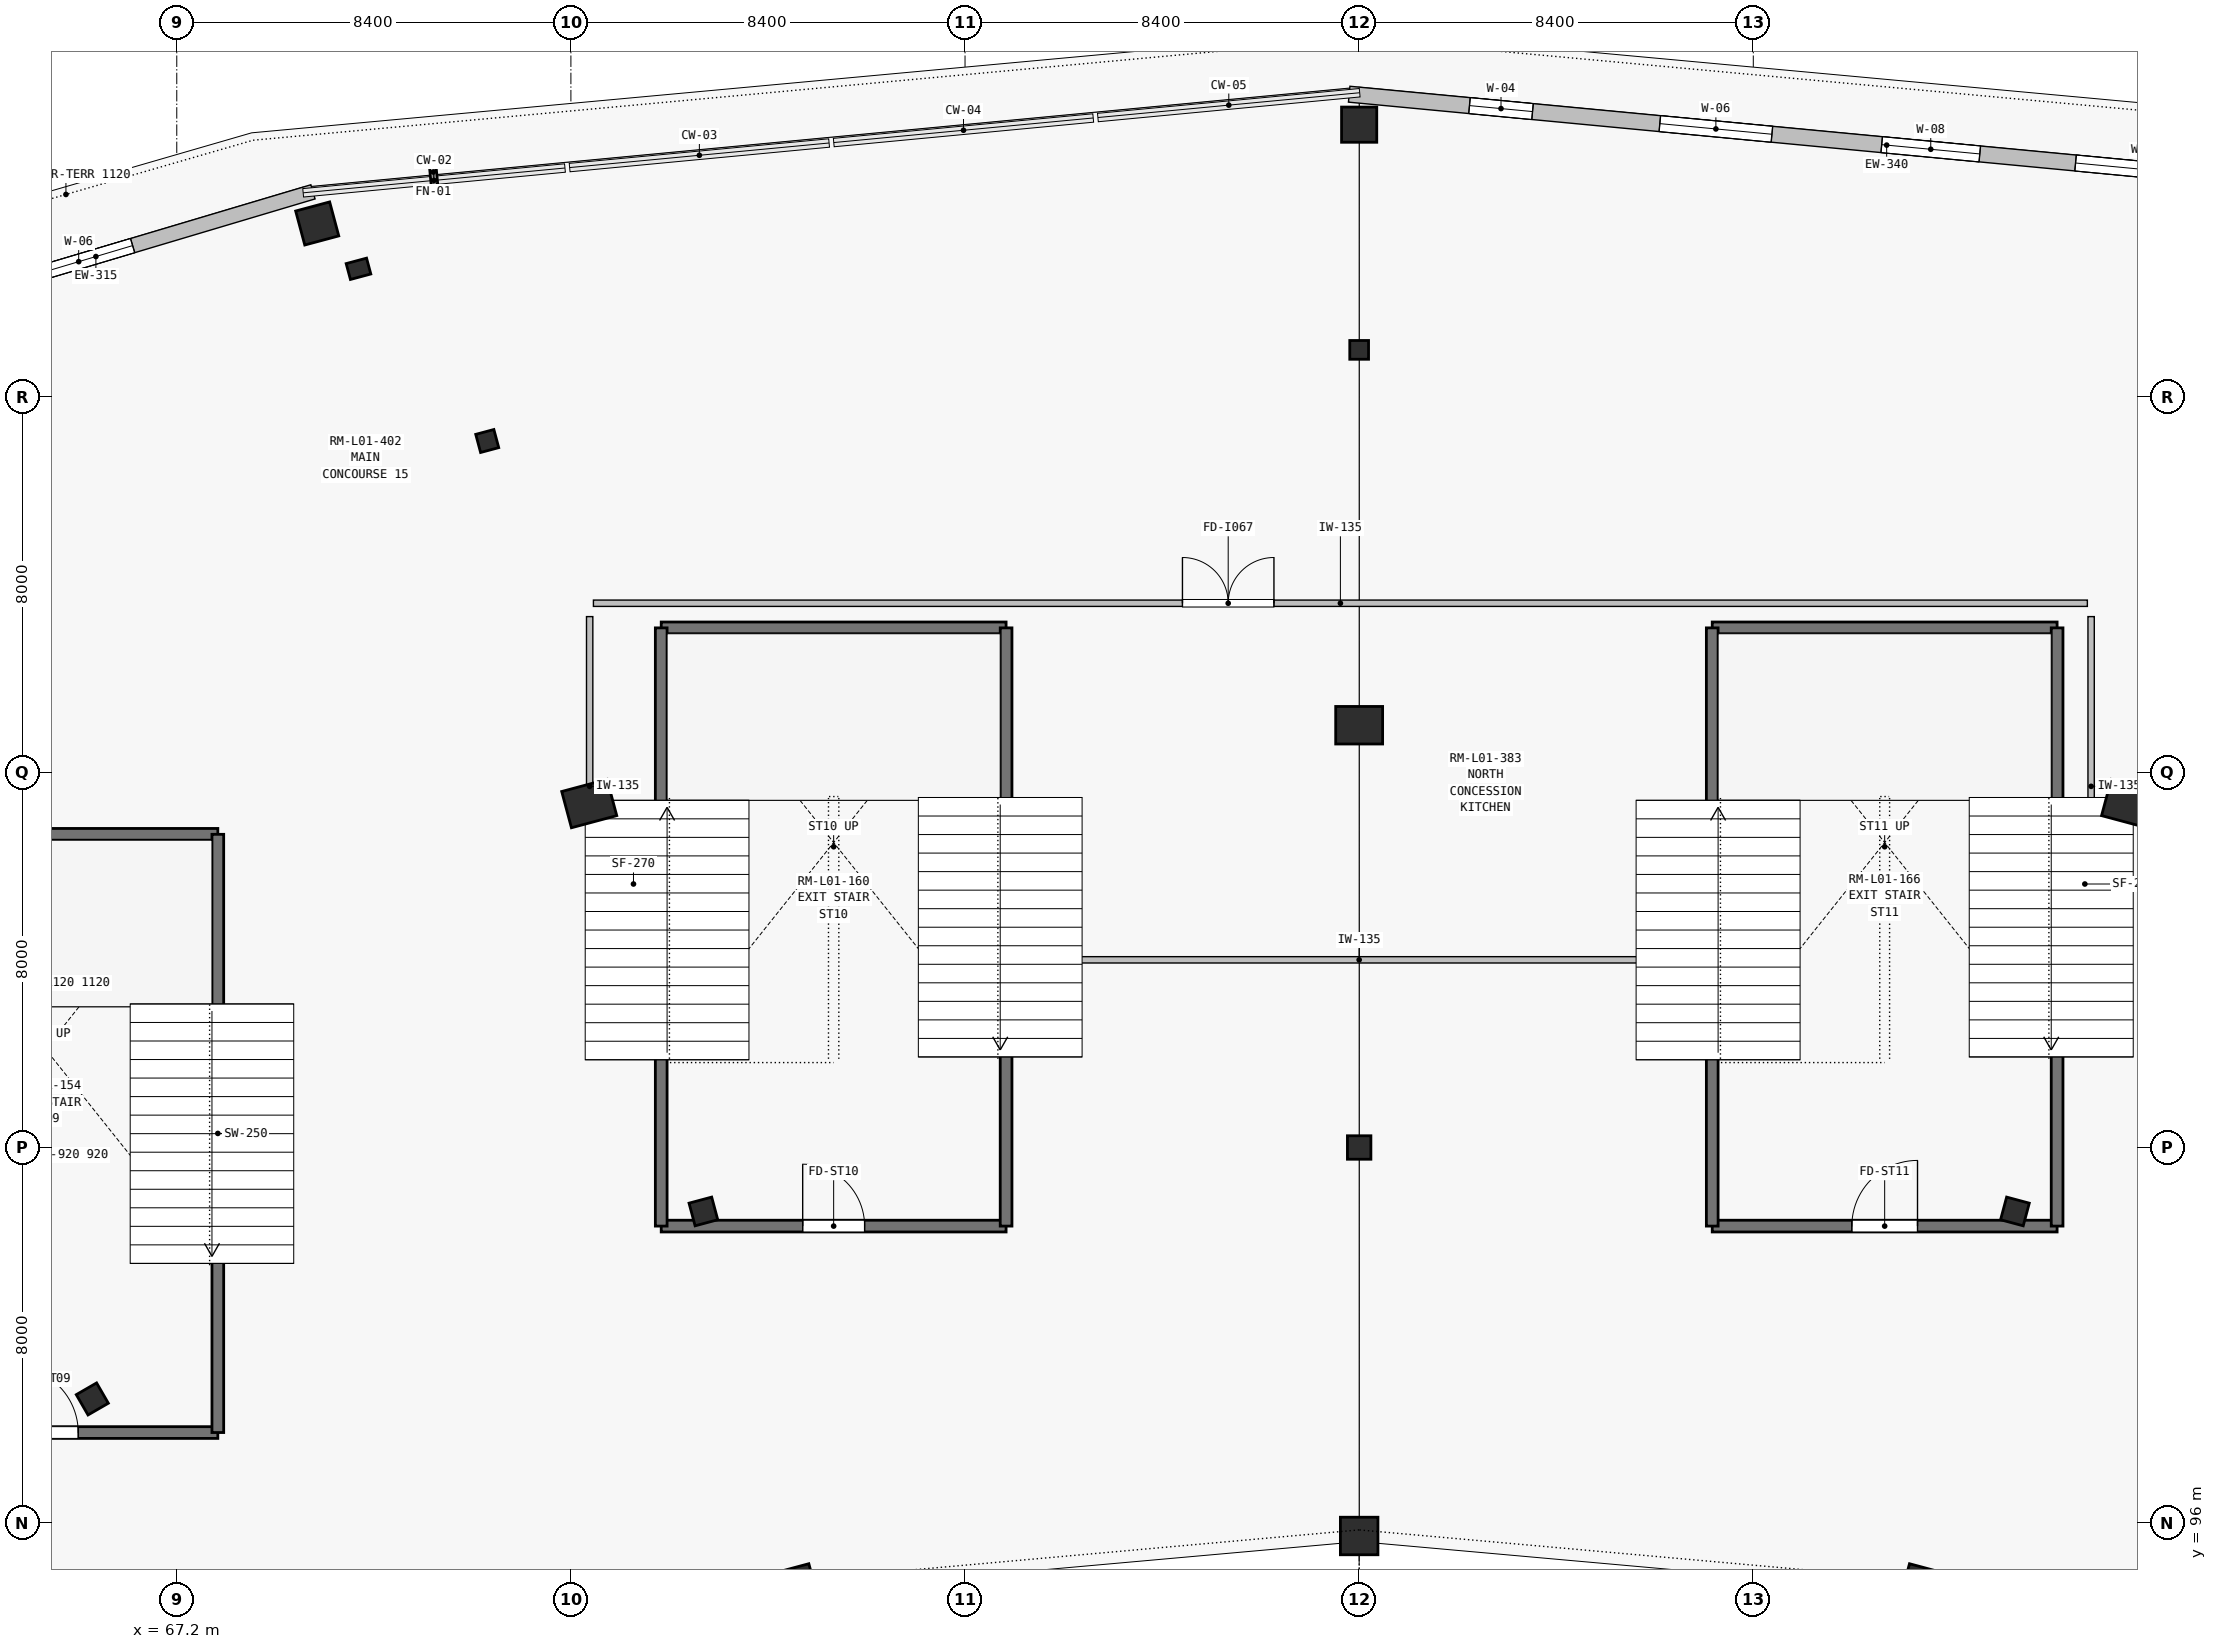
"""IFC4 building model, lengths in metres.
Left out: names, types, materials, properties, quantities, classifications, styles, units other than length and angle.
Written with IfcOpenShell. Run it as: python <this file> out.ifc"""

import sys

from ifc_helpers import new_model, si_unit, direction, frame, frame_2d, origin, origin_2d, place, context, subcontext, project, spatial, rectangle, i_section, extrude, element, fill, save


model = new_model("IFC4")
c1 = context("Model", 3, precision=1e-05, world=origin(), true_north=direction((0.0, 1.0)))
c2 = subcontext(c1, "Body", "Model", "MODEL_VIEW")
j1 = project(units=[si_unit("LENGTHUNIT", "METRE"), si_unit("PLANEANGLEUNIT", "RADIAN")], contexts=[c1])
p1 = place(None, origin())
s1 = spatial("IfcSite", under=j1, at=p1, CompositionType="ELEMENT")
p2 = place(p1, origin())
s2 = spatial("IfcBuilding", under=s1, at=p2, CompositionType="ELEMENT")
p3 = place(p2, frame((0.0, 0.0, 5.4)))
s3 = spatial("IfcBuildingStorey", under=s2, at=p3, CompositionType="ELEMENT", Elevation=5.4)
for number, where, z_axis, x_axis in (
    (1, (106.376, 102.637, 0.0), (0.0, 0.0, 1.0), (0.259, 0.966, 0.0)),
    (2, (92.4, 104.0, 0.0), (0.0, 0.0, 1.0), (0.0, 1.0, 0.0)),
    (3, (78.424, 102.637, 0.0), (0.0, 0.0, 1.0), (-0.259, 0.966, 0.0)),
    (4, (65.4, 98.641, 0.0), (0.0, 0.0, 1.0), (-0.5, 0.866, 0.0)),
):
    element("IfcColumn", number, at=place(p3, frame(where, z_axis=z_axis, x_axis=x_axis)), inside=s3, PredefinedType="COLUMN", context=c2, shape_type="SweptSolid", body=[
        extrude(i_section(OverallWidth=0.5, OverallDepth=0.5, WebThickness=0.02, FlangeThickness=0.035, at=origin_2d()), origin(), (0.0, 0.0, 1.0), 4.5),
    ])
for number, where, z_axis, x_axis in (
    (5, (104.412, 94.639, 0.0), (0.0, 0.0, 1.0), (0.259, 0.966, 0.0)),
    (6, (92.4, 95.72, 0.0), (0.0, 0.0, 1.0), (0.0, 1.0, 0.0)),
    (7, (80.388, 94.639, 0.0), (0.0, 0.0, 1.0), (-0.259, 0.966, 0.0)),
):
    element("IfcColumn", number, at=place(p3, frame(where, z_axis=z_axis, x_axis=x_axis)), inside=s3, PredefinedType="COLUMN", context=c2, shape_type="SweptSolid", body=[
        extrude(rectangle(XDim=0.8, YDim=0.8, at=origin_2d()), origin(), (0.0, 0.0, 1.0), 4.5),
    ])
for number, where, z_axis, x_axis in (
    (8, (108.809, 111.33, 0.0), (0.0, 0.0, 1.0), (0.259, 0.966, 0.0)),
    (9, (92.4, 113.0, 0.0), (0.0, 0.0, 1.0), (0.0, 1.0, 0.0)),
    (10, (75.991, 111.33, 0.0), (0.0, 0.0, 1.0), (-0.259, 0.966, 0.0)),
):
    element("IfcColumn", number, at=place(p3, frame(where, z_axis=z_axis, x_axis=x_axis)), inside=s3, PredefinedType="COLUMN", context=c2, shape_type="SweptSolid", body=[
        extrude(rectangle(XDim=0.8, YDim=1.0, at=origin_2d()), origin(), (0.0, 0.0, 1.0), 4.5),
    ])
for number, where, z_axis, x_axis in (
    (11, (92.4, 121.0, 0.0), (0.0, 0.0, 1.0), (0.0, 1.0, 0.0)),
    (12, (73.817, 119.058, 0.0), (0.0, 0.0, 1.0), (-0.259, 0.966, 0.0)),
):
    element("IfcColumn", number, at=place(p3, frame(where, z_axis=z_axis, x_axis=x_axis)), inside=s3, PredefinedType="COLUMN", context=c2, shape_type="SweptSolid", body=[
        extrude(i_section(OverallWidth=0.4, OverallDepth=0.4, WebThickness=0.018, FlangeThickness=0.032, at=origin_2d()), origin(), (0.0, 0.0, 1.0), 4.5),
    ])
for number, where, z_axis, x_axis in (
    (13, (92.4, 125.8, 0.0), (0.0, 0.0, 1.0), (0.0, 1.0, 0.0)),
    (14, (70.193, 123.694, 0.0), (0.0, 0.0, 1.0), (-0.259, 0.966, 0.0)),
):
    element("IfcColumn", number, at=place(p3, frame(where, z_axis=z_axis, x_axis=x_axis)), inside=s3, PredefinedType="COLUMN", context=c2, shape_type="SweptSolid", body=[
        extrude(rectangle(XDim=0.75, YDim=0.75, at=origin_2d()), origin(), (0.0, 0.0, 1.0), 4.25),
    ])
p4 = place(p3, frame((71.073, 122.728, 0.0), z_axis=(0.0, 0.0, 1.0), x_axis=(-0.258819045103, 0.965925826289, 0.0)))
e15 = element("IfcColumn", 15, at=p4, inside=s3, PredefinedType="PILASTER", context=c2, shape_type="SweptSolid", body=[
    extrude(rectangle(XDim=0.35, YDim=0.45, at=origin_2d()), origin(), (0.0, 0.0, 1.0), 4.5),
])
p5 = place(p3, frame((48.77, 118.01, 0.0), z_axis=(0.0, 0.0, 1.0), x_axis=(0.958340022304, 0.285629833265, 0.0)))
e16 = element("IfcWall", 16, at=p5, inside=s3, PredefinedType="SOLIDWALL", context=c2, shape_type="SweptSolid", body=[
    extrude(rectangle(XDim=22.26, YDim=0.315, at=frame_2d((11.13, 0.0))), origin(), (0.0, 0.0, 1.0), 4.25),
])
p6 = place(p5, frame((2.525, 0.0, 0.9)))
e17 = element("IfcOpeningElement", 17, at=p6, cuts=e16, PredefinedType="OPENING", context=c2, shape_type="SweptSolid", body=[
    extrude(rectangle(XDim=1.45, YDim=1.4, at=frame_2d((0.725, 0.7))), frame((0.0, 0.167, 0.0), z_axis=(0.0, -1.0, 0.0), x_axis=(1.0, 0.0, 0.0)), (0.0, 0.0, 1.0), 0.335),
])
p7 = place(p5, frame((7.025, 0.0, 0.75)))
e18 = element("IfcOpeningElement", 18, at=p7, cuts=e16, PredefinedType="OPENING", context=c2, shape_type="SweptSolid", body=[
    extrude(rectangle(XDim=1.65, YDim=2.4, at=frame_2d((0.825, 1.2))), frame((0.0, 0.167, 0.0), z_axis=(0.0, -1.0, 0.0), x_axis=(1.0, 0.0, 0.0)), (0.0, 0.0, 1.0), 0.335),
])
p8 = place(p5, frame((11.775, 0.0, 0.75)))
e19 = element("IfcOpeningElement", 19, at=p8, cuts=e16, PredefinedType="OPENING", context=c2, shape_type="SweptSolid", body=[
    extrude(rectangle(XDim=1.35, YDim=2.3, at=frame_2d((0.675, 1.15))), frame((0.0, 0.167, 0.0), z_axis=(0.0, -1.0, 0.0), x_axis=(1.0, 0.0, 0.0)), (0.0, 0.0, 1.0), 0.335),
])
p9 = place(p5, frame((15.85, 0.0, 0.9)))
e20 = element("IfcOpeningElement", 20, at=p9, cuts=e16, PredefinedType="OPENING", context=c2, shape_type="SweptSolid", body=[
    extrude(rectangle(XDim=2.4, YDim=2.1, at=frame_2d((1.2, 1.05))), frame((0.0, 0.167, 0.0), z_axis=(0.0, -1.0, 0.0), x_axis=(1.0, 0.0, 0.0)), (0.0, 0.0, 1.0), 0.335),
])
p10 = place(p3, frame((92.188, 126.449, 0.0), z_axis=(0.0, 0.0, 1.0), x_axis=(0.995543549064, -0.094302926339, 0.0)))
e21 = element("IfcWall", 21, at=p10, inside=s3, PredefinedType="SOLIDWALL", context=c2, shape_type="SweptSolid", body=[
    extrude(rectangle(XDim=23.013, YDim=0.34, at=frame_2d((11.506, 0.0))), origin(), (0.0, 0.0, 1.0), 4.25),
])
p11 = place(p10, frame((2.575, 0.0, 0.75)))
e22 = element("IfcOpeningElement", 22, at=p11, cuts=e21, PredefinedType="OPENING", context=c2, shape_type="SweptSolid", body=[
    extrude(rectangle(XDim=1.35, YDim=2.3, at=frame_2d((0.675, 1.15))), frame((0.0, 0.18, 0.0), z_axis=(0.0, -1.0, 0.0), x_axis=(1.0, 0.0, 0.0)), (0.0, 0.0, 1.0), 0.36),
])
p12 = place(p10, frame((6.65, 0.0, 0.9)))
e23 = element("IfcOpeningElement", 23, at=p12, cuts=e21, PredefinedType="OPENING", context=c2, shape_type="SweptSolid", body=[
    extrude(rectangle(XDim=2.4, YDim=2.1, at=frame_2d((1.2, 1.05))), frame((0.0, 0.18, 0.0), z_axis=(0.0, -1.0, 0.0), x_axis=(1.0, 0.0, 0.0)), (0.0, 0.0, 1.0), 0.36),
])
p13 = place(p10, frame((11.4, 0.0, 0.9)))
e24 = element("IfcOpeningElement", 24, at=p13, cuts=e21, PredefinedType="OPENING", context=c2, shape_type="SweptSolid", body=[
    extrude(rectangle(XDim=2.1, YDim=2.0, at=frame_2d((1.05, 1.0))), frame((0.0, 0.18, 0.0), z_axis=(0.0, -1.0, 0.0), x_axis=(1.0, 0.0, 0.0)), (0.0, 0.0, 1.0), 0.36),
])
p14 = place(p10, frame((15.55, 0.0, 0.9)))
e25 = element("IfcOpeningElement", 25, at=p14, cuts=e21, PredefinedType="OPENING", context=c2, shape_type="SweptSolid", body=[
    extrude(rectangle(XDim=3.0, YDim=1.6, at=frame_2d((1.5, 0.8))), frame((0.0, 0.18, 0.0), z_axis=(0.0, -1.0, 0.0), x_axis=(1.0, 0.0, 0.0)), (0.0, 0.0, 1.0), 0.36),
])
p15 = place(p3, frame((60.725, 97.925, 0.0), z_axis=(0.0, 0.0, 1.0), x_axis=(1.0, 0.0, 0.0)))
e26 = element("IfcWall", 26, at=p15, inside=s3, PredefinedType="SHEAR", context=c2, shape_type="SweptSolid", body=[
    extrude(rectangle(XDim=7.35, YDim=0.25, at=frame_2d((3.675, 0.0))), origin(), (0.0, 0.0, 1.0), 4.5),
])
p16 = place(p15, frame((2.975, 0.0, 0.0)))
e27 = element("IfcOpeningElement", 27, at=p16, cuts=e26, PredefinedType="OPENING", context=c2, shape_type="SweptSolid", body=[
    extrude(rectangle(XDim=1.4, YDim=2.2, at=frame_2d((0.7, 1.1))), frame((0.0, 0.135, 0.0), z_axis=(0.0, -1.0, 0.0), x_axis=(1.0, 0.0, 0.0)), (0.0, 0.0, 1.0), 0.27),
])
p17 = place(p3, frame((60.725, 110.675, 0.0), z_axis=(0.0, 0.0, 1.0), x_axis=(1.0, 0.0, 0.0)))
e28 = element("IfcWall", 28, at=p17, inside=s3, PredefinedType="SHEAR", context=c2, shape_type="SweptSolid", body=[
    extrude(rectangle(XDim=7.35, YDim=0.25, at=frame_2d((3.675, 0.0))), origin(), (0.0, 0.0, 1.0), 4.5),
])
p18 = place(p3, frame((68.075, 97.925, 0.0), z_axis=(0.0, 0.0, 1.0), x_axis=(0.0, 1.0, 0.0)))
e29 = element("IfcWall", 29, at=p18, inside=s3, PredefinedType="SHEAR", context=c2, shape_type="SweptSolid", body=[
    extrude(rectangle(XDim=12.75, YDim=0.25, at=frame_2d((6.375, 0.0))), origin(), (0.0, 0.0, 1.0), 4.5),
])
p19 = place(p3, frame((77.525, 102.325, 0.0), z_axis=(0.0, 0.0, 1.0), x_axis=(1.0, 0.0, 0.0)))
e30 = element("IfcWall", 30, at=p19, inside=s3, PredefinedType="SHEAR", context=c2, shape_type="SweptSolid", body=[
    extrude(rectangle(XDim=7.35, YDim=0.25, at=frame_2d((3.675, 0.0))), origin(), (0.0, 0.0, 1.0), 4.5),
])
p20 = place(p19, frame((3.015, 0.0, 0.0)))
e31 = element("IfcOpeningElement", 31, at=p20, cuts=e30, PredefinedType="OPENING", context=c2, shape_type="SweptSolid", body=[
    extrude(rectangle(XDim=1.32, YDim=2.2, at=frame_2d((0.66, 1.1))), frame((0.0, 0.135, 0.0), z_axis=(0.0, -1.0, 0.0), x_axis=(1.0, 0.0, 0.0)), (0.0, 0.0, 1.0), 0.27),
])
p21 = place(p3, frame((77.525, 115.075, 0.0), z_axis=(0.0, 0.0, 1.0), x_axis=(1.0, 0.0, 0.0)))
e32 = element("IfcWall", 32, at=p21, inside=s3, PredefinedType="SHEAR", context=c2, shape_type="SweptSolid", body=[
    extrude(rectangle(XDim=7.35, YDim=0.25, at=frame_2d((3.675, 0.0))), origin(), (0.0, 0.0, 1.0), 4.5),
])
for number, where, z_axis, x_axis in (
    (33, (77.525, 102.325, 0.0), (0.0, 0.0, 1.0), (0.0, 1.0, 0.0)),
    (34, (84.875, 102.325, 0.0), (0.0, 0.0, 1.0), (0.0, 1.0, 0.0)),
):
    element("IfcWall", number, at=place(p3, frame(where, z_axis=z_axis, x_axis=x_axis)), inside=s3, PredefinedType="SHEAR", context=c2, shape_type="SweptSolid", body=[
        extrude(rectangle(XDim=12.75, YDim=0.25, at=frame_2d((6.375, 0.0))), origin(), (0.0, 0.0, 1.0), 4.5),
    ])
p22 = place(p3, frame((99.925, 102.325, 0.0), z_axis=(0.0, 0.0, 1.0), x_axis=(1.0, 0.0, 0.0)))
e35 = element("IfcWall", 35, at=p22, inside=s3, PredefinedType="SHEAR", context=c2, shape_type="SweptSolid", body=[
    extrude(rectangle(XDim=7.35, YDim=0.25, at=frame_2d((3.675, 0.0))), origin(), (0.0, 0.0, 1.0), 4.5),
])
p23 = place(p22, frame((2.975, 0.0, 0.0)))
e36 = element("IfcOpeningElement", 36, at=p23, cuts=e35, PredefinedType="OPENING", context=c2, shape_type="SweptSolid", body=[
    extrude(rectangle(XDim=1.4, YDim=2.2, at=frame_2d((0.7, 1.1))), frame((0.0, 0.135, 0.0), z_axis=(0.0, -1.0, 0.0), x_axis=(1.0, 0.0, 0.0)), (0.0, 0.0, 1.0), 0.27),
])
p24 = place(p3, frame((99.925, 115.075, 0.0), z_axis=(0.0, 0.0, 1.0), x_axis=(1.0, 0.0, 0.0)))
e37 = element("IfcWall", 37, at=p24, inside=s3, PredefinedType="SHEAR", context=c2, shape_type="SweptSolid", body=[
    extrude(rectangle(XDim=7.35, YDim=0.25, at=frame_2d((3.675, 0.0))), origin(), (0.0, 0.0, 1.0), 4.5),
])
for number, where, z_axis, x_axis in (
    (38, (99.925, 102.325, 0.0), (0.0, 0.0, 1.0), (0.0, 1.0, 0.0)),
    (39, (107.275, 102.325, 0.0), (0.0, 0.0, 1.0), (0.0, 1.0, 0.0)),
):
    element("IfcWall", number, at=place(p3, frame(where, z_axis=z_axis, x_axis=x_axis)), inside=s3, PredefinedType="SHEAR", context=c2, shape_type="SweptSolid", body=[
        extrude(rectangle(XDim=12.75, YDim=0.25, at=frame_2d((6.375, 0.0))), origin(), (0.0, 0.0, 1.0), 4.5),
    ])
p25 = place(p3, frame((76.08, 115.6, 0.0), z_axis=(0.0, 0.0, 1.0), x_axis=(1.0, 0.0, 0.0)))
e40 = element("IfcWall", 40, at=p25, inside=s3, PredefinedType="PARTITIONING", context=c2, shape_type="SweptSolid", body=[
    extrude(rectangle(XDim=31.84, YDim=0.135, at=frame_2d((15.92, 0.0))), origin(), (0.0, 0.0, 1.0), 3.662),
])
p26 = place(p25, frame((12.554, 0.0, 0.0)))
e41 = element("IfcOpeningElement", 41, at=p26, cuts=e40, PredefinedType="OPENING", context=c2, shape_type="SweptSolid", body=[
    extrude(rectangle(XDim=1.95, YDim=2.4, at=frame_2d((0.975, 1.2))), frame((0.0, 0.077, 0.0), z_axis=(0.0, -1.0, 0.0), x_axis=(1.0, 0.0, 0.0)), (0.0, 0.0, 1.0), 0.155),
])
p27 = place(p3, frame((108.0, 115.315, 0.0), z_axis=(0.0, 0.0, 1.0), x_axis=(0.0, -1.0, 0.0)))
e42 = element("IfcWall", 42, at=p27, inside=s3, PredefinedType="PARTITIONING", context=c2, shape_type="SweptSolid", body=[
    extrude(rectangle(XDim=7.235, YDim=0.135, at=frame_2d((3.618, 0.0))), origin(), (0.0, 0.0, 1.0), 3.662),
])
p28 = place(p3, frame((99.425, 108.0, 0.0), z_axis=(0.0, 0.0, 1.0), x_axis=(-1.0, 0.0, 0.0)))
e43 = element("IfcWall", 43, at=p28, inside=s3, PredefinedType="PARTITIONING", context=c2, shape_type="SweptSolid", body=[
    extrude(rectangle(XDim=14.05, YDim=0.135, at=frame_2d((7.025, 0.0))), origin(), (0.0, 0.0, 1.0), 3.662),
])
p29 = place(p3, frame((76.0, 108.08, 0.0), z_axis=(0.0, 0.0, 1.0), x_axis=(0.0, 1.0, 0.0)))
e44 = element("IfcWall", 44, at=p29, inside=s3, PredefinedType="PARTITIONING", context=c2, shape_type="SweptSolid", body=[
    extrude(rectangle(XDim=7.235, YDim=0.135, at=frame_2d((3.618, 0.0))), origin(), (0.0, 0.0, 1.0), 3.672),
])
p30 = place(p9, origin())
e45 = element("IfcWindow", 45, at=p30, inside=s3, PartitioningType="SINGLE_PANEL", PredefinedType="WINDOW", context=c2, shape_type="SweptSolid", body=[
    extrude(rectangle(XDim=2.4, YDim=2.1, at=frame_2d((1.2, 1.05))), frame((0.0, 0.03, 0.0), z_axis=(0.0, -1.0, 0.0), x_axis=(1.0, 0.0, 0.0)), (0.0, 0.0, 1.0), 0.06),
])
fill(e20, e45)
p31 = place(p11, origin())
e46 = element("IfcWindow", 46, at=p31, inside=s3, PartitioningType="SINGLE_PANEL", PredefinedType="WINDOW", context=c2, shape_type="SweptSolid", body=[
    extrude(rectangle(XDim=1.35, YDim=2.3, at=frame_2d((0.675, 1.15))), frame((0.0, 0.03, 0.0), z_axis=(0.0, -1.0, 0.0), x_axis=(1.0, 0.0, 0.0)), (0.0, 0.0, 1.0), 0.06),
])
fill(e22, e46)
p32 = place(p12, origin())
e47 = element("IfcWindow", 47, at=p32, inside=s3, PartitioningType="SINGLE_PANEL", PredefinedType="WINDOW", context=c2, shape_type="SweptSolid", body=[
    extrude(rectangle(XDim=2.4, YDim=2.1, at=frame_2d((1.2, 1.05))), frame((0.0, 0.03, 0.0), z_axis=(0.0, -1.0, 0.0), x_axis=(1.0, 0.0, 0.0)), (0.0, 0.0, 1.0), 0.06),
])
fill(e23, e47)
p33 = place(p13, origin())
e48 = element("IfcWindow", 48, at=p33, inside=s3, PartitioningType="SINGLE_PANEL", PredefinedType="WINDOW", context=c2, shape_type="SweptSolid", body=[
    extrude(rectangle(XDim=2.1, YDim=2.0, at=frame_2d((1.05, 1.0))), frame((0.0, 0.03, 0.0), z_axis=(0.0, -1.0, 0.0), x_axis=(1.0, 0.0, 0.0)), (0.0, 0.0, 1.0), 0.06),
])
fill(e24, e48)
p34 = place(p14, origin())
e49 = element("IfcWindow", 49, at=p34, inside=s3, PartitioningType="SINGLE_PANEL", PredefinedType="WINDOW", context=c2, shape_type="SweptSolid", body=[
    extrude(rectangle(XDim=3.0, YDim=1.6, at=frame_2d((1.5, 0.8))), frame((0.0, 0.03, 0.0), z_axis=(0.0, -1.0, 0.0), x_axis=(1.0, 0.0, 0.0)), (0.0, 0.0, 1.0), 0.06),
])
fill(e25, e49)
p35 = place(p16, origin())
e50 = element("IfcDoor", 50, at=p35, inside=s3, OperationType="SINGLE_SWING_LEFT", PredefinedType="DOOR", context=c2, shape_type="SweptSolid", body=[
    extrude(rectangle(XDim=1.4, YDim=2.2, at=frame_2d((0.7, 1.1))), frame((0.0, 0.025, 0.0), z_axis=(0.0, -1.0, 0.0), x_axis=(1.0, 0.0, 0.0)), (0.0, 0.0, 1.0), 0.05),
])
fill(e27, e50)
p36 = place(p20, origin())
e51 = element("IfcDoor", 51, at=p36, inside=s3, OperationType="SINGLE_SWING_LEFT", PredefinedType="DOOR", context=c2, shape_type="SweptSolid", body=[
    extrude(rectangle(XDim=1.32, YDim=2.2, at=frame_2d((0.66, 1.1))), frame((0.0, 0.025, 0.0), z_axis=(0.0, -1.0, 0.0), x_axis=(1.0, 0.0, 0.0)), (0.0, 0.0, 1.0), 0.05),
])
fill(e31, e51)
p37 = place(p23, origin())
e52 = element("IfcDoor", 52, at=p37, inside=s3, OperationType="SINGLE_SWING_RIGHT", PredefinedType="DOOR", context=c2, shape_type="SweptSolid", body=[
    extrude(rectangle(XDim=1.4, YDim=2.2, at=frame_2d((0.7, 1.1))), frame((0.0, 0.025, 0.0), z_axis=(0.0, -1.0, 0.0), x_axis=(1.0, 0.0, 0.0)), (0.0, 0.0, 1.0), 0.05),
])
fill(e36, e52)
p38 = place(p26, origin())
e53 = element("IfcDoor", 53, at=p38, inside=s3, OperationType="DOUBLE_DOOR_SINGLE_SWING", PredefinedType="DOOR", context=c2, shape_type="SweptSolid", body=[
    extrude(rectangle(XDim=1.95, YDim=2.4, at=frame_2d((0.975, 1.2))), frame((0.0, 0.025, 0.0), z_axis=(0.0, -1.0, 0.0), x_axis=(1.0, 0.0, 0.0)), (0.0, 0.0, 1.0), 0.05),
])
fill(e41, e53)
save(model, sys.argv[1])
